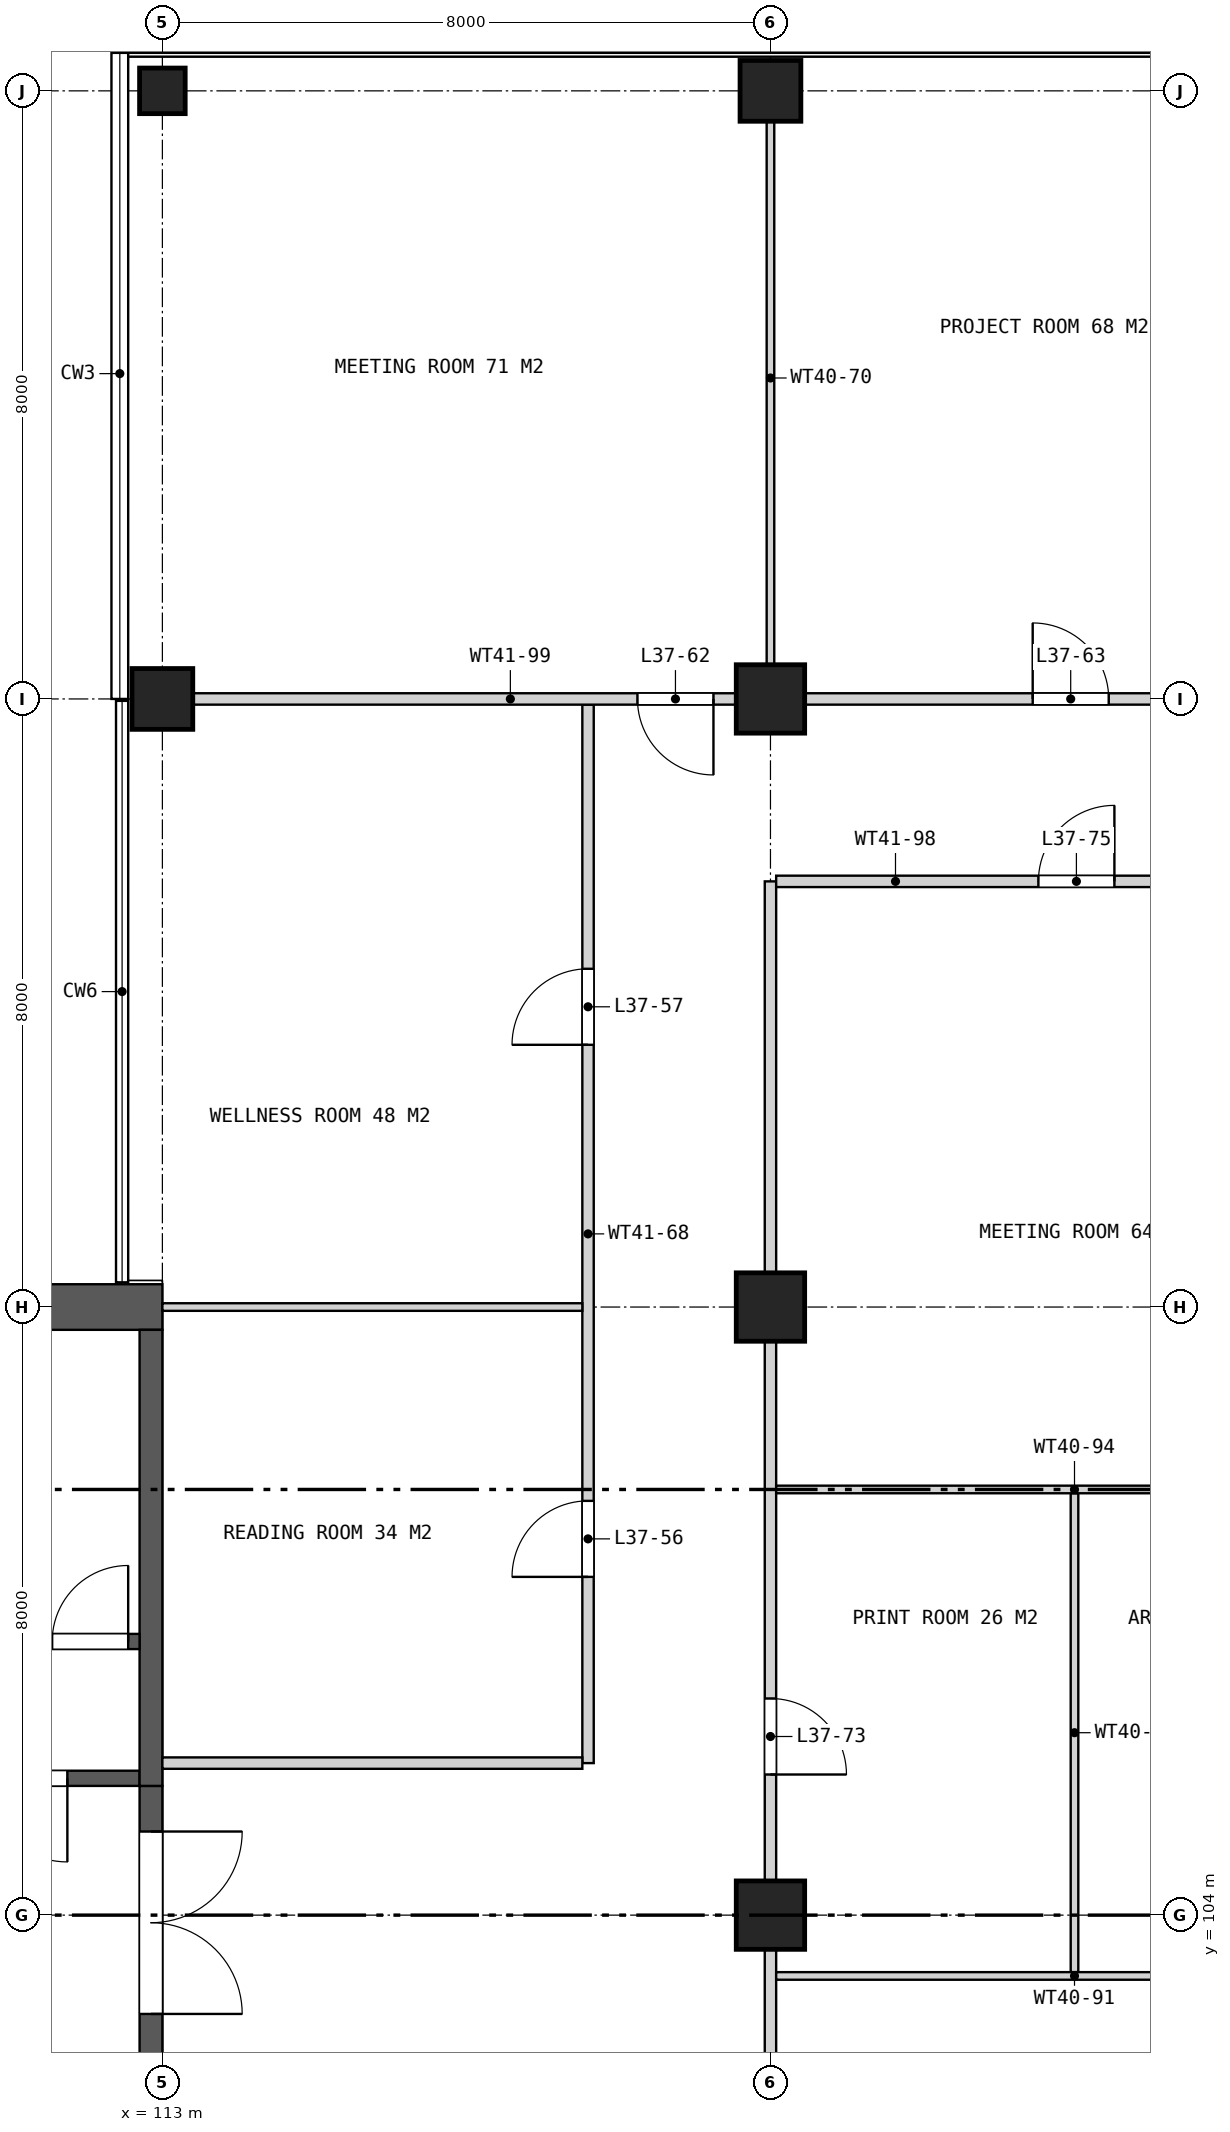
"""IFC4 building model, lengths in metres.
Left out: names, types, materials, properties, quantities, classifications, styles, units other than length and angle.
Written with IfcOpenShell. Run it as: python <this file> out.ifc"""

import sys

from ifc_helpers import new_model, si_unit, direction, frame, frame_2d, origin, origin_2d, place, context, subcontext, project, spatial, rectangle, extrude, element, fill, save


model = new_model("IFC4")
c1 = context("Model", 3, precision=1e-05, world=origin(), true_north=direction((0.0, 1.0)))
c2 = subcontext(c1, "Body", "Model", "MODEL_VIEW")
j1 = project(units=[si_unit("LENGTHUNIT", "METRE"), si_unit("PLANEANGLEUNIT", "RADIAN")], contexts=[c1])
p1 = place(None, origin())
s1 = spatial("IfcSite", under=j1, at=p1, CompositionType="ELEMENT")
p2 = place(p1, origin())
s2 = spatial("IfcBuilding", under=s1, at=p2, CompositionType="ELEMENT")
p3 = place(p2, frame((0.0, 0.0, 178.9)))
s3 = spatial("IfcBuildingStorey", under=s2, at=p3, CompositionType="ELEMENT", Elevation=178.9)
p4 = place(p3, frame((113.0, 120.0, 0.0), z_axis=(0.0, 0.0, 1.0), x_axis=(1.0, 0.0, 0.0)))
e1 = element("IfcColumn", 1, at=p4, inside=s3, PredefinedType="COLUMN", context=c2, shape_type="SweptSolid", body=[
    extrude(rectangle(XDim=0.8, YDim=0.8, at=origin_2d()), origin(), (0.0, 0.0, 1.0), 4.2),
])
p5 = place(p3, frame((113.0, 128.0, 0.0), z_axis=(0.0, 0.0, 1.0), x_axis=(1.0, 0.0, 0.0)))
e2 = element("IfcColumn", 2, at=p5, inside=s3, PredefinedType="COLUMN", context=c2, shape_type="SweptSolid", body=[
    extrude(rectangle(XDim=0.6, YDim=0.6, at=origin_2d()), origin(), (0.0, 0.0, 1.0), 4.2),
])
for number, where, z_axis, x_axis in (
    (3, (121.0, 104.0, 0.0), (0.0, 0.0, 1.0), (1.0, 0.0, 0.0)),
    (4, (121.0, 112.0, 0.0), (0.0, 0.0, 1.0), (1.0, 0.0, 0.0)),
    (5, (121.0, 120.0, 0.0), (0.0, 0.0, 1.0), (1.0, 0.0, 0.0)),
):
    element("IfcColumn", number, at=place(p3, frame(where, z_axis=z_axis, x_axis=x_axis)), inside=s3, PredefinedType="COLUMN", context=c2, shape_type="SweptSolid", body=[
        extrude(rectangle(XDim=0.9, YDim=0.9, at=origin_2d()), origin(), (0.0, 0.0, 1.0), 4.2),
    ])
p6 = place(p3, frame((121.0, 128.0, 0.0), z_axis=(0.0, 0.0, 1.0), x_axis=(1.0, 0.0, 0.0)))
e6 = element("IfcColumn", 6, at=p6, inside=s3, PredefinedType="COLUMN", context=c2, shape_type="SweptSolid", body=[
    extrude(rectangle(XDim=0.8, YDim=0.8, at=origin_2d()), origin(), (0.0, 0.0, 1.0), 4.2),
])
p7 = place(p3, frame((113.0, 112.0, 0.0), z_axis=(0.0, 0.0, 1.0), x_axis=(-1.0, 0.0, 0.0)))
e7 = element("IfcWall", 7, at=p7, inside=s3, PredefinedType="SHEAR", context=c2, shape_type="SweptSolid", body=[
    extrude(rectangle(XDim=7.1, YDim=0.6, at=frame_2d((3.55, 0.0))), origin(), (0.0, 0.0, 1.0), 4.2),
])
p8 = place(p3, frame((112.85, 105.7, 0.0), z_axis=(0.0, 0.0, 1.0), x_axis=(0.0, -1.0, 0.0)))
e8 = element("IfcWall", 8, at=p8, inside=s3, PredefinedType="SHEAR", context=c2, shape_type="SweptSolid", body=[
    extrude(rectangle(XDim=11.4, YDim=0.3, at=frame_2d((5.7, 0.0))), origin(), (0.0, 0.0, 1.0), 4.2),
])
p9 = place(p8, frame((0.6, 0.0, 0.0)))
e9 = element("IfcOpeningElement", 9, at=p9, cuts=e8, PredefinedType="OPENING", context=c2, shape_type="SweptSolid", body=[
    extrude(rectangle(XDim=2.4, YDim=2.4, at=frame_2d((1.2, 1.2))), frame((0.0, 0.16, 0.0), z_axis=(0.0, -1.0, 0.0), x_axis=(1.0, 0.0, 0.0)), (0.0, 0.0, 1.0), 0.32),
])
p10 = place(p8, frame((4.5, 0.0, 0.0)))
e10 = element("IfcOpeningElement", 10, at=p10, cuts=e8, PredefinedType="OPENING", context=c2, shape_type="SweptSolid", body=[
    extrude(rectangle(XDim=2.4, YDim=2.4, at=frame_2d((1.2, 1.2))), frame((0.0, 0.16, 0.0), z_axis=(0.0, -1.0, 0.0), x_axis=(1.0, 0.0, 0.0)), (0.0, 0.0, 1.0), 0.32),
])
p11 = place(p8, frame((8.4, 0.0, 0.0)))
e11 = element("IfcOpeningElement", 11, at=p11, cuts=e8, PredefinedType="OPENING", context=c2, shape_type="SweptSolid", body=[
    extrude(rectangle(XDim=2.4, YDim=2.4, at=frame_2d((1.2, 1.2))), frame((0.0, 0.16, 0.0), z_axis=(0.0, -1.0, 0.0), x_axis=(1.0, 0.0, 0.0)), (0.0, 0.0, 1.0), 0.32),
])
p12 = place(p3, frame((112.7, 105.8, 0.0), z_axis=(0.0, 0.0, 1.0), x_axis=(-1.0, 0.0, 0.0)))
e12 = element("IfcWall", 12, at=p12, inside=s3, PredefinedType="SHEAR", context=c2, shape_type="SweptSolid", body=[
    extrude(rectangle(XDim=15.4, YDim=0.2, at=frame_2d((7.7, 0.0))), origin(), (0.0, 0.0, 1.0), 4.2),
])
p13 = place(p12, frame((0.95, 0.0, 0.0)))
e13 = element("IfcOpeningElement", 13, at=p13, cuts=e12, PredefinedType="OPENING", context=c2, shape_type="SweptSolid", body=[
    extrude(rectangle(XDim=1.1, YDim=2.1, at=frame_2d((0.55, 1.05))), frame((0.0, 0.11, 0.0), z_axis=(0.0, -1.0, 0.0), x_axis=(1.0, 0.0, 0.0)), (0.0, 0.0, 1.0), 0.22),
])
p14 = place(p3, frame((112.85, 111.7, 0.0), z_axis=(0.0, 0.0, 1.0), x_axis=(0.0, -1.0, 0.0)))
e14 = element("IfcWall", 14, at=p14, inside=s3, PredefinedType="SHEAR", context=c2, shape_type="SweptSolid", body=[
    extrude(rectangle(XDim=6.0, YDim=0.3, at=frame_2d((3.0, 0.0))), origin(), (0.0, 0.0, 1.0), 4.2),
])
p15 = place(p3, frame((112.7, 107.6, 0.0), z_axis=(0.0, 0.0, 1.0), x_axis=(-1.0, 0.0, 0.0)))
e15 = element("IfcWall", 15, at=p15, inside=s3, PredefinedType="SHEAR", context=c2, shape_type="SweptSolid", body=[
    extrude(rectangle(XDim=6.8, YDim=0.2, at=frame_2d((3.4, 0.0))), origin(), (0.0, 0.0, 1.0), 4.2),
])
p16 = place(p15, frame((0.15, 0.0, 0.0)))
e16 = element("IfcOpeningElement", 16, at=p16, cuts=e15, PredefinedType="OPENING", context=c2, shape_type="SweptSolid", body=[
    extrude(rectangle(XDim=1.0, YDim=2.1, at=frame_2d((0.5, 1.05))), frame((0.0, 0.11, 0.0), z_axis=(0.0, -1.0, 0.0), x_axis=(1.0, 0.0, 0.0)), (0.0, 0.0, 1.0), 0.22),
])
p17 = place(p3, frame((118.6, 106.0, 0.0), z_axis=(0.0, 0.0, 1.0), x_axis=(0.0, 1.0, 0.0)))
e17 = element("IfcWall", 17, at=p17, inside=s3, PredefinedType="PARTITIONING", context=c2, shape_type="SweptSolid", body=[
    extrude(rectangle(XDim=13.925, YDim=0.15, at=frame_2d((6.962, 0.0))), origin(), (0.0, 0.0, 1.0), 3.44),
])
p18 = place(p17, frame((2.45, 0.0, 0.0)))
e18 = element("IfcOpeningElement", 18, at=p18, cuts=e17, PredefinedType="OPENING", context=c2, shape_type="SweptSolid", body=[
    extrude(rectangle(XDim=1.0, YDim=2.1, at=frame_2d((0.5, 1.05))), frame((0.0, 0.085, 0.0), z_axis=(0.0, -1.0, 0.0), x_axis=(1.0, 0.0, 0.0)), (0.0, 0.0, 1.0), 0.17),
])
p19 = place(p17, frame((9.45, 0.0, 0.0)))
e19 = element("IfcOpeningElement", 19, at=p19, cuts=e17, PredefinedType="OPENING", context=c2, shape_type="SweptSolid", body=[
    extrude(rectangle(XDim=1.0, YDim=2.1, at=frame_2d((0.5, 1.05))), frame((0.0, 0.085, 0.0), z_axis=(0.0, -1.0, 0.0), x_axis=(1.0, 0.0, 0.0)), (0.0, 0.0, 1.0), 0.17),
])
p20 = place(p3, frame((121.0, 82.4, 0.0), z_axis=(0.0, 0.0, 1.0), x_axis=(0.0, 1.0, 0.0)))
e20 = element("IfcWall", 20, at=p20, inside=s3, PredefinedType="PARTITIONING", context=c2, shape_type="SweptSolid", body=[
    extrude(rectangle(XDim=35.2, YDim=0.15, at=frame_2d((17.6, 0.0))), origin(), (0.0, 0.0, 1.0), 3.44),
])
p21 = place(p20, frame((8.25, 0.0, 0.0)))
e21 = element("IfcOpeningElement", 21, at=p21, cuts=e20, PredefinedType="OPENING", context=c2, shape_type="SweptSolid", body=[
    extrude(rectangle(XDim=1.0, YDim=2.1, at=frame_2d((0.5, 1.05))), frame((0.0, 0.085, 0.0), z_axis=(0.0, -1.0, 0.0), x_axis=(1.0, 0.0, 0.0)), (0.0, 0.0, 1.0), 0.17),
])
p22 = place(p20, frame((14.35, 0.0, 0.0)))
e22 = element("IfcOpeningElement", 22, at=p22, cuts=e20, PredefinedType="OPENING", context=c2, shape_type="SweptSolid", body=[
    extrude(rectangle(XDim=1.0, YDim=2.1, at=frame_2d((0.5, 1.05))), frame((0.0, 0.085, 0.0), z_axis=(0.0, -1.0, 0.0), x_axis=(1.0, 0.0, 0.0)), (0.0, 0.0, 1.0), 0.17),
])
p23 = place(p20, frame((18.75, 0.0, 0.0)))
e23 = element("IfcOpeningElement", 23, at=p23, cuts=e20, PredefinedType="OPENING", context=c2, shape_type="SweptSolid", body=[
    extrude(rectangle(XDim=1.0, YDim=2.1, at=frame_2d((0.5, 1.05))), frame((0.0, 0.085, 0.0), z_axis=(0.0, -1.0, 0.0), x_axis=(1.0, 0.0, 0.0)), (0.0, 0.0, 1.0), 0.17),
])
p24 = place(p20, frame((23.45, 0.0, 0.0)))
e24 = element("IfcOpeningElement", 24, at=p24, cuts=e20, PredefinedType="OPENING", context=c2, shape_type="SweptSolid", body=[
    extrude(rectangle(XDim=1.0, YDim=2.1, at=frame_2d((0.5, 1.05))), frame((0.0, 0.085, 0.0), z_axis=(0.0, -1.0, 0.0), x_axis=(1.0, 0.0, 0.0)), (0.0, 0.0, 1.0), 0.17),
])
p25 = place(p3, frame((121.0, 120.075, 0.0), z_axis=(0.0, 0.0, 1.0), x_axis=(0.0, 1.0, 0.0)))
e25 = element("IfcWall", 25, at=p25, inside=s3, PredefinedType="PARTITIONING", context=c2, shape_type="SweptSolid", body=[
    extrude(rectangle(XDim=8.295, YDim=0.1, at=frame_2d((4.147, 0.0))), origin(), (0.0, 0.0, 1.0), 3.44),
])
p26 = place(p3, frame((125.0, 103.25, 0.0), z_axis=(0.0, 0.0, 1.0), x_axis=(0.0, 1.0, 0.0)))
e26 = element("IfcWall", 26, at=p26, inside=s3, PredefinedType="PARTITIONING", context=c2, shape_type="SweptSolid", body=[
    extrude(rectangle(XDim=6.3, YDim=0.1, at=frame_2d((3.15, 0.0))), origin(), (0.0, 0.0, 1.0), 3.44),
])
p27 = place(p3, frame((121.075, 103.2, 0.0), z_axis=(0.0, 0.0, 1.0), x_axis=(1.0, 0.0, 0.0)))
e27 = element("IfcWall", 27, at=p27, inside=s3, PredefinedType="PARTITIONING", context=c2, shape_type="SweptSolid", body=[
    extrude(rectangle(XDim=7.85, YDim=0.1, at=frame_2d((3.925, 0.0))), origin(), (0.0, 0.0, 1.0), 3.44),
])
p28 = place(p3, frame((113.0, 106.0, 0.0), z_axis=(0.0, 0.0, 1.0), x_axis=(1.0, 0.0, 0.0)))
e28 = element("IfcWall", 28, at=p28, inside=s3, PredefinedType="PARTITIONING", context=c2, shape_type="SweptSolid", body=[
    extrude(rectangle(XDim=5.525, YDim=0.15, at=frame_2d((2.762, 0.0))), origin(), (0.0, 0.0, 1.0), 3.44),
])
p29 = place(p3, frame((121.075, 109.6, 0.0), z_axis=(0.0, 0.0, 1.0), x_axis=(1.0, 0.0, 0.0)))
e29 = element("IfcWall", 29, at=p29, inside=s3, PredefinedType="PARTITIONING", context=c2, shape_type="SweptSolid", body=[
    extrude(rectangle(XDim=7.85, YDim=0.1, at=frame_2d((3.925, 0.0))), origin(), (0.0, 0.0, 1.0), 3.44),
])
p30 = place(p3, frame((113.0, 112.0, 0.0), z_axis=(0.0, 0.0, 1.0), x_axis=(1.0, 0.0, 0.0)))
e30 = element("IfcWall", 30, at=p30, inside=s3, PredefinedType="PARTITIONING", context=c2, shape_type="SweptSolid", body=[
    extrude(rectangle(XDim=5.525, YDim=0.1, at=frame_2d((2.762, 0.0))), origin(), (0.0, 0.0, 1.0), 3.44),
])
p31 = place(p3, frame((121.075, 117.6, 0.0), z_axis=(0.0, 0.0, 1.0), x_axis=(1.0, 0.0, 0.0)))
e31 = element("IfcWall", 31, at=p31, inside=s3, PredefinedType="PARTITIONING", context=c2, shape_type="SweptSolid", body=[
    extrude(rectangle(XDim=7.85, YDim=0.15, at=frame_2d((3.925, 0.0))), origin(), (0.0, 0.0, 1.0), 3.44),
])
p32 = place(p31, frame((3.45, 0.0, 0.0)))
e32 = element("IfcOpeningElement", 32, at=p32, cuts=e31, PredefinedType="OPENING", context=c2, shape_type="SweptSolid", body=[
    extrude(rectangle(XDim=1.0, YDim=2.1, at=frame_2d((0.5, 1.05))), frame((0.0, 0.085, 0.0), z_axis=(0.0, -1.0, 0.0), x_axis=(1.0, 0.0, 0.0)), (0.0, 0.0, 1.0), 0.17),
])
p33 = place(p3, frame((112.63, 120.0, 0.0), z_axis=(0.0, 0.0, 1.0), x_axis=(1.0, 0.0, 0.0)))
e33 = element("IfcWall", 33, at=p33, inside=s3, PredefinedType="PARTITIONING", context=c2, shape_type="SweptSolid", body=[
    extrude(rectangle(XDim=24.74, YDim=0.15, at=frame_2d((12.37, 0.0))), origin(), (0.0, 0.0, 1.0), 3.44),
])
p34 = place(p33, frame((6.62, 0.0, 0.0)))
e34 = element("IfcOpeningElement", 34, at=p34, cuts=e33, PredefinedType="OPENING", context=c2, shape_type="SweptSolid", body=[
    extrude(rectangle(XDim=1.0, YDim=2.1, at=frame_2d((0.5, 1.05))), frame((0.0, 0.085, 0.0), z_axis=(0.0, -1.0, 0.0), x_axis=(1.0, 0.0, 0.0)), (0.0, 0.0, 1.0), 0.17),
])
p35 = place(p33, frame((11.82, 0.0, 0.0)))
e35 = element("IfcOpeningElement", 35, at=p35, cuts=e33, PredefinedType="OPENING", context=c2, shape_type="SweptSolid", body=[
    extrude(rectangle(XDim=1.0, YDim=2.1, at=frame_2d((0.5, 1.05))), frame((0.0, 0.085, 0.0), z_axis=(0.0, -1.0, 0.0), x_axis=(1.0, 0.0, 0.0)), (0.0, 0.0, 1.0), 0.17),
])
p36 = place(p33, frame((17.02, 0.0, 0.0)))
e36 = element("IfcOpeningElement", 36, at=p36, cuts=e33, PredefinedType="OPENING", context=c2, shape_type="SweptSolid", body=[
    extrude(rectangle(XDim=1.0, YDim=2.1, at=frame_2d((0.5, 1.05))), frame((0.0, 0.085, 0.0), z_axis=(0.0, -1.0, 0.0), x_axis=(1.0, 0.0, 0.0)), (0.0, 0.0, 1.0), 0.17),
])
p37 = place(p9, origin())
e37 = element("IfcDoor", 37, at=p37, inside=s3, OperationType="DOUBLE_DOOR_SINGLE_SWING", PredefinedType="DOOR", context=c2, shape_type="SweptSolid", body=[
    extrude(rectangle(XDim=2.4, YDim=2.4, at=frame_2d((1.2, 1.2))), frame((0.0, 0.025, 0.0), z_axis=(0.0, -1.0, 0.0), x_axis=(1.0, 0.0, 0.0)), (0.0, 0.0, 1.0), 0.05),
])
fill(e9, e37)
p38 = place(p13, origin())
e38 = element("IfcDoor", 38, at=p38, inside=s3, OperationType="SINGLE_SWING_LEFT", PredefinedType="DOOR", context=c2, shape_type="SweptSolid", body=[
    extrude(rectangle(XDim=1.1, YDim=2.1, at=frame_2d((0.55, 1.05))), frame((0.0, 0.025, 0.0), z_axis=(0.0, -1.0, 0.0), x_axis=(1.0, 0.0, 0.0)), (0.0, 0.0, 1.0), 0.05),
])
fill(e13, e38)
p39 = place(p16, frame((1.0, 0.0, 0.0), z_axis=(0.0, 0.0, 1.0), x_axis=(-1.0, 0.0, 0.0)))
e39 = element("IfcDoor", 39, at=p39, inside=s3, OperationType="SINGLE_SWING_RIGHT", PredefinedType="DOOR", context=c2, shape_type="SweptSolid", body=[
    extrude(rectangle(XDim=1.0, YDim=2.1, at=frame_2d((0.5, 1.05))), frame((0.0, 0.025, 0.0), z_axis=(0.0, -1.0, 0.0), x_axis=(1.0, 0.0, 0.0)), (0.0, 0.0, 1.0), 0.05),
])
fill(e16, e39)
p40 = place(p18, origin())
e40 = element("IfcDoor", 40, at=p40, inside=s3, OperationType="SINGLE_SWING_LEFT", PredefinedType="DOOR", context=c2, shape_type="SweptSolid", body=[
    extrude(rectangle(XDim=1.0, YDim=2.1, at=frame_2d((0.5, 1.05))), frame((0.0, 0.025, 0.0), z_axis=(0.0, -1.0, 0.0), x_axis=(1.0, 0.0, 0.0)), (0.0, 0.0, 1.0), 0.05),
])
fill(e18, e40)
p41 = place(p19, origin())
e41 = element("IfcDoor", 41, at=p41, inside=s3, OperationType="SINGLE_SWING_LEFT", PredefinedType="DOOR", context=c2, shape_type="SweptSolid", body=[
    extrude(rectangle(XDim=1.0, YDim=2.1, at=frame_2d((0.5, 1.05))), frame((0.0, 0.025, 0.0), z_axis=(0.0, -1.0, 0.0), x_axis=(1.0, 0.0, 0.0)), (0.0, 0.0, 1.0), 0.05),
])
fill(e19, e41)
p42 = place(p34, frame((1.0, 0.0, 0.0), z_axis=(0.0, 0.0, 1.0), x_axis=(-1.0, 0.0, 0.0)))
e42 = element("IfcDoor", 42, at=p42, inside=s3, OperationType="SINGLE_SWING_LEFT", PredefinedType="DOOR", context=c2, shape_type="SweptSolid", body=[
    extrude(rectangle(XDim=1.0, YDim=2.1, at=frame_2d((0.5, 1.05))), frame((0.0, 0.025, 0.0), z_axis=(0.0, -1.0, 0.0), x_axis=(1.0, 0.0, 0.0)), (0.0, 0.0, 1.0), 0.05),
])
fill(e34, e42)
p43 = place(p35, origin())
e43 = element("IfcDoor", 43, at=p43, inside=s3, OperationType="SINGLE_SWING_LEFT", PredefinedType="DOOR", context=c2, shape_type="SweptSolid", body=[
    extrude(rectangle(XDim=1.0, YDim=2.1, at=frame_2d((0.5, 1.05))), frame((0.0, 0.025, 0.0), z_axis=(0.0, -1.0, 0.0), x_axis=(1.0, 0.0, 0.0)), (0.0, 0.0, 1.0), 0.05),
])
fill(e35, e43)
p44 = place(p24, frame((1.0, 0.0, 0.0), z_axis=(0.0, 0.0, 1.0), x_axis=(-1.0, 0.0, 0.0)))
e44 = element("IfcDoor", 44, at=p44, inside=s3, OperationType="SINGLE_SWING_RIGHT", PredefinedType="DOOR", context=c2, shape_type="SweptSolid", body=[
    extrude(rectangle(XDim=1.0, YDim=2.1, at=frame_2d((0.5, 1.05))), frame((0.0, 0.025, 0.0), z_axis=(0.0, -1.0, 0.0), x_axis=(1.0, 0.0, 0.0)), (0.0, 0.0, 1.0), 0.05),
])
fill(e24, e44)
p45 = place(p32, origin())
e45 = element("IfcDoor", 45, at=p45, inside=s3, OperationType="SINGLE_SWING_RIGHT", PredefinedType="DOOR", context=c2, shape_type="SweptSolid", body=[
    extrude(rectangle(XDim=1.0, YDim=2.1, at=frame_2d((0.5, 1.05))), frame((0.0, 0.025, 0.0), z_axis=(0.0, -1.0, 0.0), x_axis=(1.0, 0.0, 0.0)), (0.0, 0.0, 1.0), 0.05),
])
fill(e32, e45)
save(model, sys.argv[1])
